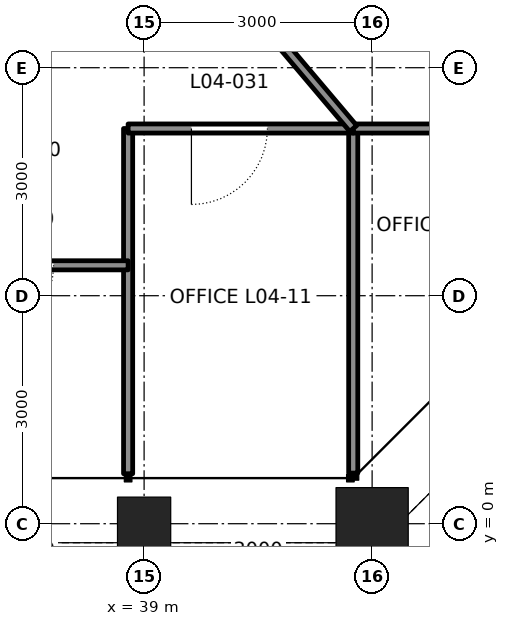
"""IFC4 building model, lengths in metres.
Left out: names, types, materials, properties, quantities, classifications, styles, units other than length and angle.
Written with IfcOpenShell. Run it as: python <this file> out.ifc"""

import sys

from ifc_helpers import new_model, si_unit, direction, frame, frame_2d, origin, origin_2d, place, context, subcontext, project, spatial, rectangle, hollow_rectangle, extrude, element, fill, save


model = new_model("IFC4")
c1 = context("Model", 3, precision=1e-05, world=origin(), true_north=direction((0.0, 1.0)))
c2 = subcontext(c1, "Body", "Model", "MODEL_VIEW")
j1 = project(units=[si_unit("LENGTHUNIT", "METRE"), si_unit("PLANEANGLEUNIT", "RADIAN")], contexts=[c1])
p1 = place(None, origin())
s1 = spatial("IfcSite", under=j1, at=p1, CompositionType="ELEMENT")
p2 = place(p1, origin())
s2 = spatial("IfcBuilding", under=s1, at=p2, CompositionType="ELEMENT")
p3 = place(p2, frame((0.0, 0.0, 24.3)))
s3 = spatial("IfcBuildingStorey", under=s2, at=p3, CompositionType="ELEMENT", Elevation=24.3)
p4 = place(p3, frame((39.0, 0.0, 0.0), z_axis=(0.0, 0.0, 1.0), x_axis=(0.0, -1.0, 0.0)))
e1 = element("IfcColumn", 1, at=p4, inside=s3, PredefinedType="COLUMN", context=c2, shape_type="SweptSolid", body=[
    extrude(hollow_rectangle(XDim=0.7, YDim=0.7, WallThickness=0.07, at=origin_2d()), origin(), (0.0, 0.0, 1.0), 4.5),
])
p5 = place(p3, frame((42.0, 0.0, 0.0), z_axis=(0.0, 0.0, 1.0), x_axis=(0.0, -1.0, 0.0)))
e2 = element("IfcColumn", 2, at=p5, inside=s3, PredefinedType="COLUMN", context=c2, shape_type="SweptSolid", body=[
    extrude(hollow_rectangle(XDim=0.95, YDim=0.95, WallThickness=0.095, at=origin_2d()), origin(), (0.0, 0.0, 1.0), 4.5),
])
p6 = place(p3, frame((38.79, 0.657, -0.3), z_axis=(0.0, 0.0, 1.0), x_axis=(0.0, 1.0, 0.0)))
e3 = element("IfcWall", 3, at=p6, inside=s3, PredefinedType="PARTITIONING", context=c2, shape_type="SweptSolid", body=[
    extrude(rectangle(XDim=4.542, YDim=0.12, at=frame_2d((2.271, 0.0))), origin(), (0.0, 0.0, 1.0), 4.34),
])
p7 = place(p3, frame((41.751, 0.666, -0.3), z_axis=(0.0, 0.0, 1.0), x_axis=(0.0, 1.0, 0.0)))
e4 = element("IfcWall", 4, at=p7, inside=s3, PredefinedType="PARTITIONING", context=c2, shape_type="SweptSolid", body=[
    extrude(rectangle(XDim=4.534, YDim=0.12, at=frame_2d((2.267, 0.0))), origin(), (0.0, 0.0, 1.0), 4.34),
])
p8 = place(p3, frame((35.828, 3.4, -0.3), z_axis=(0.0, 0.0, 1.0), x_axis=(1.0, 0.0, 0.0)))
e5 = element("IfcWall", 5, at=p8, inside=s3, PredefinedType="PARTITIONING", context=c2, shape_type="SweptSolid", body=[
    extrude(rectangle(XDim=2.962, YDim=0.12, at=frame_2d((1.481, 0.0))), origin(), (0.0, 0.0, 1.0), 4.34),
])
p9 = place(p8, frame((0.981, 0.0, 0.3)))
e6 = element("IfcOpeningElement", 6, at=p9, cuts=e5, PredefinedType="OPENING", context=c2, shape_type="SweptSolid", body=[
    extrude(rectangle(XDim=1.0, YDim=2.4, at=frame_2d((0.5, 1.2))), frame((0.0, 0.07, 0.0), z_axis=(0.0, -1.0, 0.0), x_axis=(1.0, 0.0, 0.0)), (0.0, 0.0, 1.0), 0.14),
])
p10 = place(p3, frame((38.79, 5.2, -0.3), z_axis=(0.0, 0.0, 1.0), x_axis=(1.0, 0.0, 0.0)))
e7 = element("IfcWall", 7, at=p10, inside=s3, PredefinedType="PARTITIONING", context=c2, shape_type="SweptSolid", body=[
    extrude(rectangle(XDim=2.962, YDim=0.12, at=frame_2d((1.481, 0.0))), origin(), (0.0, 0.0, 1.0), 4.34),
])
p11 = place(p10, frame((0.833, 0.0, 0.3)))
e8 = element("IfcOpeningElement", 8, at=p11, cuts=e7, PredefinedType="OPENING", context=c2, shape_type="SweptSolid", body=[
    extrude(rectangle(XDim=1.0, YDim=2.4, at=frame_2d((0.5, 1.2))), frame((0.0, 0.07, 0.0), z_axis=(0.0, -1.0, 0.0), x_axis=(1.0, 0.0, 0.0)), (0.0, 0.0, 1.0), 0.14),
])
p12 = place(p3, frame((41.751, 5.2, -0.3), z_axis=(0.0, 0.0, 1.0), x_axis=(1.0, 0.0, 0.0)))
e9 = element("IfcWall", 9, at=p12, inside=s3, PredefinedType="PARTITIONING", context=c2, shape_type="SweptSolid", body=[
    extrude(rectangle(XDim=2.616, YDim=0.12, at=frame_2d((1.308, 0.0))), origin(), (0.0, 0.0, 1.0), 4.34),
])
p13 = place(p12, frame((1.156, 0.0, 0.3)))
e10 = element("IfcOpeningElement", 10, at=p13, cuts=e9, PredefinedType="OPENING", context=c2, shape_type="SweptSolid", body=[
    extrude(rectangle(XDim=1.0, YDim=2.4, at=frame_2d((0.5, 1.2))), frame((0.0, 0.07, 0.0), z_axis=(0.0, -1.0, 0.0), x_axis=(1.0, 0.0, 0.0)), (0.0, 0.0, 1.0), 0.14),
])
p14 = place(p3, frame((36.0, 12.0, -0.3), z_axis=(0.0, 0.0, 1.0), x_axis=(0.645783707661, -0.763520401116, 0.0)))
e11 = element("IfcWall", 11, at=p14, inside=s3, PredefinedType="PARTITIONING", context=c2, shape_type="SweptSolid", body=[
    extrude(rectangle(XDim=8.906, YDim=0.12, at=frame_2d((4.453, 0.0))), origin(), (0.0, 0.0, 1.0), 4.34),
])
p15 = place(p14, frame((1.167, 0.0, 0.3)))
e12 = element("IfcOpeningElement", 12, at=p15, cuts=e11, PredefinedType="OPENING", context=c2, shape_type="SweptSolid", body=[
    extrude(rectangle(XDim=1.0, YDim=2.4, at=frame_2d((0.5, 1.2))), frame((0.0, 0.07, 0.0), z_axis=(0.0, -1.0, 0.0), x_axis=(1.0, 0.0, 0.0)), (0.0, 0.0, 1.0), 0.14),
])
p16 = place(p9, frame((1.0, 0.0, 0.0), z_axis=(0.0, 0.0, 1.0), x_axis=(-1.0, 0.0, 0.0)))
e13 = element("IfcDoor", 13, at=p16, inside=s3, OperationType="SINGLE_SWING_RIGHT", PredefinedType="DOOR", context=c2, shape_type="SweptSolid", body=[
    extrude(rectangle(XDim=1.0, YDim=2.4, at=frame_2d((0.5, 1.2))), frame((0.0, 0.025, 0.0), z_axis=(0.0, -1.0, 0.0), x_axis=(1.0, 0.0, 0.0)), (0.0, 0.0, 1.0), 0.05),
])
fill(e6, e13)
p17 = place(p11, frame((1.0, 0.0, 0.0), z_axis=(0.0, 0.0, 1.0), x_axis=(-1.0, 0.0, 0.0)))
e14 = element("IfcDoor", 14, at=p17, inside=s3, OperationType="SINGLE_SWING_RIGHT", PredefinedType="DOOR", context=c2, shape_type="SweptSolid", body=[
    extrude(rectangle(XDim=1.0, YDim=2.4, at=frame_2d((0.5, 1.2))), frame((0.0, 0.025, 0.0), z_axis=(0.0, -1.0, 0.0), x_axis=(1.0, 0.0, 0.0)), (0.0, 0.0, 1.0), 0.05),
])
fill(e8, e14)
save(model, sys.argv[1])
